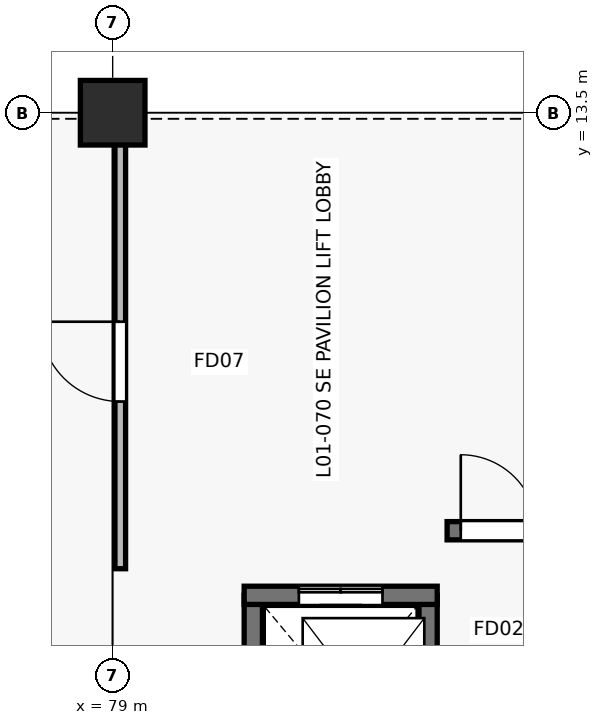
"""IFC4 building model, lengths in metres.
Left out: names, types, materials, properties, quantities, classifications, styles, units other than length and angle.
Written with IfcOpenShell. Run it as: python <this file> out.ifc"""

import sys

from ifc_helpers import new_model, si_unit, direction, frame, frame_2d, origin, origin_2d, place, context, subcontext, project, spatial, rectangle, extrude, element, fill, save


model = new_model("IFC4")
c1 = context("Model", 3, precision=1e-05, world=origin(), true_north=direction((0.0, 1.0)))
c2 = subcontext(c1, "Body", "Model", "MODEL_VIEW")
j1 = project(units=[si_unit("LENGTHUNIT", "METRE"), si_unit("PLANEANGLEUNIT", "RADIAN")], contexts=[c1])
p1 = place(None, origin())
s1 = spatial("IfcSite", under=j1, at=p1, CompositionType="ELEMENT")
p2 = place(p1, origin())
s2 = spatial("IfcBuilding", under=s1, at=p2, CompositionType="ELEMENT")
p3 = place(p2, frame((0.0, 0.0, 4.8)))
s3 = spatial("IfcBuildingStorey", under=s2, at=p3, CompositionType="ELEMENT", Elevation=4.8)
p4 = place(p3, frame((79.0, 13.5, 0.0), z_axis=(0.0, 0.0, 1.0), x_axis=(1.0, 0.0, 0.0)))
e1 = element("IfcColumn", 1, at=p4, inside=s3, PredefinedType="COLUMN", context=c2, shape_type="SweptSolid", body=[
    extrude(rectangle(XDim=0.85, YDim=0.85, at=origin_2d()), origin(), (0.0, 0.0, 1.0), 4.2),
])
for number, where, z_axis, x_axis in (
    (2, (80.85, 4.45, 0.0), (0.0, 0.0, 1.0), (0.0, 1.0, 0.0)),
    (3, (83.15, 7.15, 0.0), (0.0, 0.0, 1.0), (0.0, -1.0, 0.0)),
):
    element("IfcWall", number, at=place(p3, frame(where, z_axis=z_axis, x_axis=x_axis)), inside=s3, PredefinedType="SHEAR", context=c2, shape_type="SweptSolid", body=[
        extrude(rectangle(XDim=2.7, YDim=0.24, at=frame_2d((1.35, 0.0))), origin(), (0.0, 0.0, 1.0), 4.2),
    ])
p5 = place(p3, frame((80.73, 7.15, 0.0), z_axis=(0.0, 0.0, 1.0), x_axis=(1.0, 0.0, 0.0)))
e4 = element("IfcWall", 4, at=p5, inside=s3, PredefinedType="SHEAR", context=c2, shape_type="SweptSolid", body=[
    extrude(rectangle(XDim=2.54, YDim=0.24, at=frame_2d((1.27, 0.0))), origin(), (0.0, 0.0, 1.0), 4.2),
])
p6 = place(p5, frame((0.72, 0.0, 0.0)))
e5 = element("IfcOpeningElement", 5, at=p6, cuts=e4, PredefinedType="OPENING", context=c2, shape_type="SweptSolid", body=[
    extrude(rectangle(XDim=1.1, YDim=2.15, at=frame_2d((0.55, 1.075))), frame((0.0, 0.13, 0.0), z_axis=(0.0, -1.0, 0.0), x_axis=(1.0, 0.0, 0.0)), (0.0, 0.0, 1.0), 0.26),
])
p7 = place(p3, frame((83.4, 8.0, 0.0), z_axis=(0.0, 0.0, 1.0), x_axis=(1.0, 0.0, 0.0)))
e6 = element("IfcWall", 6, at=p7, inside=s3, PredefinedType="SHEAR", context=c2, shape_type="SweptSolid", body=[
    extrude(rectangle(XDim=7.15, YDim=0.24, at=frame_2d((3.575, 0.0))), origin(), (0.0, 0.0, 1.0), 4.2),
])
p8 = place(p7, frame((0.18, 0.0, 0.0)))
e7 = element("IfcOpeningElement", 7, at=p8, cuts=e6, PredefinedType="OPENING", context=c2, shape_type="SweptSolid", body=[
    extrude(rectangle(XDim=1.0, YDim=2.15, at=frame_2d((0.5, 1.075))), frame((0.0, 0.13, 0.0), z_axis=(0.0, -1.0, 0.0), x_axis=(1.0, 0.0, 0.0)), (0.0, 0.0, 1.0), 0.26),
])
p9 = place(p3, frame((79.1, 7.5, 0.0), z_axis=(0.0, 0.0, 1.0), x_axis=(0.0, 1.0, 0.0)))
e8 = element("IfcWall", 8, at=p9, inside=s3, PredefinedType="PARTITIONING", context=c2, shape_type="SweptSolid", body=[
    extrude(rectangle(XDim=5.9, YDim=0.14, at=frame_2d((2.95, 0.0))), origin(), (0.0, 0.0, 1.0), 2.475),
])
p10 = place(p9, frame((2.2, 0.0, 0.0)))
e9 = element("IfcOpeningElement", 9, at=p10, cuts=e8, PredefinedType="OPENING", context=c2, shape_type="SweptSolid", body=[
    extrude(rectangle(XDim=1.05, YDim=2.1, at=frame_2d((0.525, 1.05))), frame((0.0, 0.08, 0.0), z_axis=(0.0, -1.0, 0.0), x_axis=(1.0, 0.0, 0.0)), (0.0, 0.0, 1.0), 0.16),
])
p11 = place(p6, origin())
e10 = element("IfcDoor", 10, at=p11, inside=s3, OperationType="DOUBLE_DOOR_SLIDING", PredefinedType="USERDEFINED", context=c2, shape_type="SweptSolid", body=[
    extrude(rectangle(XDim=1.1, YDim=2.15, at=frame_2d((0.55, 1.075))), frame((0.0, 0.025, 0.0), z_axis=(0.0, -1.0, 0.0), x_axis=(1.0, 0.0, 0.0)), (0.0, 0.0, 1.0), 0.05),
])
fill(e5, e10)
p12 = place(p8, origin())
e11 = element("IfcDoor", 11, at=p12, inside=s3, OperationType="SINGLE_SWING_LEFT", PredefinedType="DOOR", context=c2, shape_type="SweptSolid", body=[
    extrude(rectangle(XDim=1.0, YDim=2.15, at=frame_2d((0.5, 1.075))), frame((0.0, 0.025, 0.0), z_axis=(0.0, -1.0, 0.0), x_axis=(1.0, 0.0, 0.0)), (0.0, 0.0, 1.0), 0.05),
])
fill(e7, e11)
p13 = place(p10, origin())
e12 = element("IfcDoor", 12, at=p13, inside=s3, OperationType="SINGLE_SWING_RIGHT", PredefinedType="DOOR", context=c2, shape_type="SweptSolid", body=[
    extrude(rectangle(XDim=1.05, YDim=2.1, at=frame_2d((0.525, 1.05))), frame((0.0, 0.025, 0.0), z_axis=(0.0, -1.0, 0.0), x_axis=(1.0, 0.0, 0.0)), (0.0, 0.0, 1.0), 0.05),
])
fill(e9, e12)
save(model, sys.argv[1])
